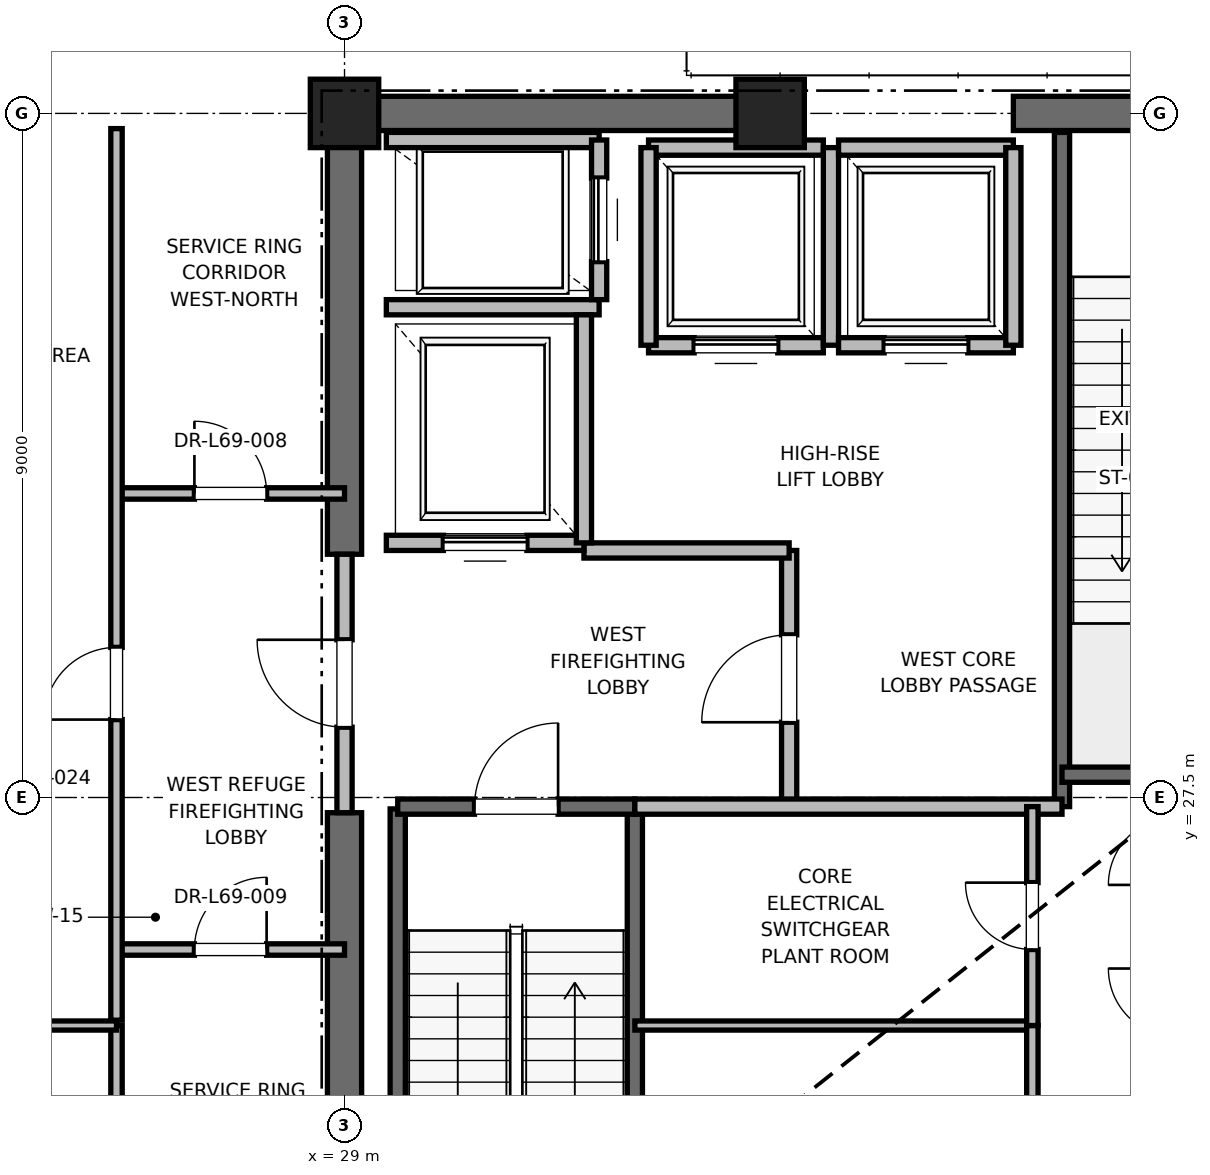
"""IFC4 building model, lengths in metres.
Left out: names, types, materials, properties, quantities, classifications, styles, units other than length and angle.
Written with IfcOpenShell. Run it as: python <this file> out.ifc"""

import sys

from ifc_helpers import new_model, si_unit, direction, frame, frame_2d, origin, origin_2d, place, context, subcontext, project, spatial, rectangle, extrude, element, fill, save


model = new_model("IFC4")
c1 = context("Model", 3, precision=1e-05, world=origin(), true_north=direction((0.0, 1.0)))
c2 = subcontext(c1, "Body", "Model", "MODEL_VIEW")
j1 = project(units=[si_unit("LENGTHUNIT", "METRE"), si_unit("PLANEANGLEUNIT", "RADIAN")], contexts=[c1])
p1 = place(None, origin())
s1 = spatial("IfcSite", under=j1, at=p1, CompositionType="ELEMENT")
p2 = place(p1, origin())
s2 = spatial("IfcBuilding", under=s1, at=p2, CompositionType="ELEMENT")
p3 = place(p2, frame((0.0, 0.0, 295.2)))
s3 = spatial("IfcBuildingStorey", under=s2, at=p3, CompositionType="ELEMENT", Elevation=295.2)
for number, where, z_axis, x_axis in (
    (1, (29.0, 36.5, 0.0), (0.0, 0.0, 1.0), (1.0, 0.0, 0.0)),
    (2, (34.6, 36.5, 0.0), (0.0, 0.0, 1.0), (1.0, 0.0, 0.0)),
):
    element("IfcColumn", number, at=place(p3, frame(where, z_axis=z_axis, x_axis=x_axis)), inside=s3, PredefinedType="PILASTER", context=c2, shape_type="SweptSolid", body=[
        extrude(rectangle(XDim=0.9, YDim=0.9, at=origin_2d()), origin(), (0.0, 0.0, 1.0), 5.8),
    ])
p4 = place(p3, frame((29.0, 36.5, 0.0), z_axis=(0.0, 0.0, 1.0), x_axis=(1.0, 0.0, 0.0)))
e3 = element("IfcWall", 3, at=p4, inside=s3, PredefinedType="SHEAR", context=c2, shape_type="SweptSolid", body=[
    extrude(rectangle(XDim=5.8, YDim=0.45, at=frame_2d((2.9, 0.0))), origin(), (0.0, 0.0, 1.0), 5.5),
])
p5 = place(p3, frame((37.8, 36.5, 0.0), z_axis=(0.0, 0.0, 1.0), x_axis=(1.0, 0.0, 0.0)))
e4 = element("IfcWall", 4, at=p5, inside=s3, PredefinedType="SHEAR", context=c2, shape_type="SweptSolid", body=[
    extrude(rectangle(XDim=4.4, YDim=0.45, at=frame_2d((2.2, 0.0))), origin(), (0.0, 0.0, 1.0), 5.5),
])
p6 = place(p5, frame((1.65, 0.0, 0.0)))
e5 = element("IfcOpeningElement", 5, at=p6, cuts=e4, PredefinedType="OPENING", context=c2, shape_type="SweptSolid", body=[
    extrude(rectangle(XDim=1.1, YDim=2.15, at=frame_2d((0.55, 1.075))), frame((0.0, 0.225, 0.0), z_axis=(0.0, -1.0, 0.0), x_axis=(1.0, 0.0, 0.0)), (0.0, 0.0, 1.0), 0.45),
])
p7 = place(p3, frame((29.0, 18.5, 0.0), z_axis=(0.0, 0.0, 1.0), x_axis=(0.0, 1.0, 0.0)))
e6 = element("IfcWall", 6, at=p7, inside=s3, PredefinedType="SHEAR", context=c2, shape_type="SweptSolid", body=[
    extrude(rectangle(XDim=8.8, YDim=0.45, at=frame_2d((4.4, 0.0))), origin(), (0.0, 0.0, 1.0), 5.5),
])
p8 = place(p3, frame((29.0, 30.7, 0.0), z_axis=(0.0, 0.0, 1.0), x_axis=(0.0, 1.0, 0.0)))
e7 = element("IfcWall", 7, at=p8, inside=s3, PredefinedType="SHEAR", context=c2, shape_type="SweptSolid", body=[
    extrude(rectangle(XDim=5.8, YDim=0.45, at=frame_2d((2.9, 0.0))), origin(), (0.0, 0.0, 1.0), 5.5),
])
p9 = place(p3, frame((29.7, 19.2, 0.0), z_axis=(0.0, 0.0, 1.0), x_axis=(0.0, 1.0, 0.0)))
e8 = element("IfcWall", 8, at=p9, inside=s3, PredefinedType="SOLIDWALL", context=c2, shape_type="SweptSolid", body=[
    extrude(rectangle(XDim=8.15, YDim=0.2, at=frame_2d((4.075, 0.0))), origin(), (0.0, 0.0, 1.0), 5.5),
])
p10 = place(p3, frame((32.82, 18.6, 0.0), z_axis=(0.0, 0.0, 1.0), x_axis=(0.0, 1.0, 0.0)))
e9 = element("IfcWall", 9, at=p10, inside=s3, PredefinedType="SOLIDWALL", context=c2, shape_type="SweptSolid", body=[
    extrude(rectangle(XDim=8.78, YDim=0.2, at=frame_2d((4.39, 0.0))), origin(), (0.0, 0.0, 1.0), 5.5),
])
p11 = place(p3, frame((29.7, 27.38, 0.0), z_axis=(0.0, 0.0, 1.0), x_axis=(1.0, 0.0, 0.0)))
e10 = element("IfcWall", 10, at=p11, inside=s3, PredefinedType="SOLIDWALL", context=c2, shape_type="SweptSolid", body=[
    extrude(rectangle(XDim=3.12, YDim=0.2, at=frame_2d((1.56, 0.0))), origin(), (0.0, 0.0, 1.0), 5.5),
])
p12 = place(p11, frame((1.01, 0.0, 0.0)))
e11 = element("IfcOpeningElement", 11, at=p12, cuts=e10, PredefinedType="OPENING", context=c2, shape_type="SweptSolid", body=[
    extrude(rectangle(XDim=1.1, YDim=2.15, at=frame_2d((0.55, 1.075))), frame((0.0, 0.1, 0.0), z_axis=(0.0, -1.0, 0.0), x_axis=(1.0, 0.0, 0.0)), (0.0, 0.0, 1.0), 0.2),
])
p13 = place(p3, frame((38.44, 27.38, 0.0), z_axis=(0.0, 0.0, 1.0), x_axis=(0.0, 1.0, 0.0)))
e12 = element("IfcWall", 12, at=p13, inside=s3, PredefinedType="SOLIDWALL", context=c2, shape_type="SweptSolid", body=[
    extrude(rectangle(XDim=8.87, YDim=0.2, at=frame_2d((4.435, 0.0))), origin(), (0.0, 0.0, 1.0), 5.5),
])
p14 = place(p3, frame((38.44, 27.8, 0.0), z_axis=(0.0, 0.0, 1.0), x_axis=(1.0, 0.0, 0.0)))
e13 = element("IfcWall", 13, at=p14, inside=s3, PredefinedType="SOLIDWALL", context=c2, shape_type="SweptSolid", body=[
    extrude(rectangle(XDim=3.32, YDim=0.2, at=frame_2d((1.66, 0.0))), origin(), (0.0, 0.0, 1.0), 5.5),
])
p15 = place(p3, frame((34.85, 27.38, 0.0), z_axis=(0.0, 0.0, 1.0), x_axis=(0.0, 1.0, 0.0)))
e14 = element("IfcWall", 14, at=p15, inside=s3, PredefinedType="PARTITIONING", context=c2, shape_type="SweptSolid", body=[
    extrude(rectangle(XDim=3.37, YDim=0.2, at=frame_2d((1.685, 0.0))), origin(), (0.0, 0.0, 1.0), 5.5),
])
p16 = place(p15, frame((1.11, 0.0, 0.0)))
e15 = element("IfcOpeningElement", 15, at=p16, cuts=e14, PredefinedType="OPENING", context=c2, shape_type="SweptSolid", body=[
    extrude(rectangle(XDim=1.15, YDim=2.2, at=frame_2d((0.575, 1.1))), frame((0.0, 0.1, 0.0), z_axis=(0.0, -1.0, 0.0), x_axis=(1.0, 0.0, 0.0)), (0.0, 0.0, 1.0), 0.2),
])
p17 = place(p3, frame((29.0, 27.3, 0.0), z_axis=(0.0, 0.0, 1.0), x_axis=(0.0, 1.0, 0.0)))
e16 = element("IfcWall", 16, at=p17, inside=s3, PredefinedType="PARTITIONING", context=c2, shape_type="SweptSolid", body=[
    extrude(rectangle(XDim=3.4, YDim=0.2, at=frame_2d((1.7, 0.0))), origin(), (0.0, 0.0, 1.0), 4.58),
])
p18 = place(p17, frame((1.125, 0.0, 0.0)))
e17 = element("IfcOpeningElement", 17, at=p18, cuts=e16, PredefinedType="OPENING", context=c2, shape_type="SweptSolid", body=[
    extrude(rectangle(XDim=1.15, YDim=2.2, at=frame_2d((0.575, 1.1))), frame((0.0, 0.1, 0.0), z_axis=(0.0, -1.0, 0.0), x_axis=(1.0, 0.0, 0.0)), (0.0, 0.0, 1.0), 0.2),
])
p19 = place(p3, frame((32.82, 27.38, 0.0), z_axis=(0.0, 0.0, 1.0), x_axis=(1.0, 0.0, 0.0)))
e18 = element("IfcWall", 18, at=p19, inside=s3, PredefinedType="PARTITIONING", context=c2, shape_type="SweptSolid", body=[
    extrude(rectangle(XDim=5.62, YDim=0.2, at=frame_2d((2.81, 0.0))), origin(), (0.0, 0.0, 1.0), 5.5),
])
p20 = place(p3, frame((32.15, 30.75, 0.0), z_axis=(0.0, 0.0, 1.0), x_axis=(1.0, 0.0, 0.0)))
e19 = element("IfcWall", 19, at=p20, inside=s3, PredefinedType="PARTITIONING", context=c2, shape_type="SweptSolid", body=[
    extrude(rectangle(XDim=2.7, YDim=0.2, at=frame_2d((1.35, 0.0))), origin(), (0.0, 0.0, 1.0), 5.5),
])
p21 = place(p3, frame((29.55, 30.85, 0.0), z_axis=(0.0, 0.0, 1.0), x_axis=(1.0, 0.0, 0.0)))
e20 = element("IfcWall", 20, at=p21, inside=s3, PredefinedType="SOLIDWALL", context=c2, shape_type="SweptSolid", body=[
    extrude(rectangle(XDim=2.6, YDim=0.2, at=frame_2d((1.3, 0.0))), origin(), (0.0, 0.0, 1.0), 4.58),
])
p22 = place(p21, frame((0.75, 0.0, 0.0)))
e21 = element("IfcOpeningElement", 21, at=p22, cuts=e20, PredefinedType="OPENING", context=c2, shape_type="SweptSolid", body=[
    extrude(rectangle(XDim=1.1, YDim=2.2, at=frame_2d((0.55, 1.1))), frame((0.0, 0.1, 0.0), z_axis=(0.0, -1.0, 0.0), x_axis=(1.0, 0.0, 0.0)), (0.0, 0.0, 1.0), 0.2),
])
p23 = place(p3, frame((29.55, 33.95, 0.0), z_axis=(0.0, 0.0, 1.0), x_axis=(1.0, 0.0, 0.0)))
e22 = element("IfcWall", 22, at=p23, inside=s3, PredefinedType="SOLIDWALL", context=c2, shape_type="SweptSolid", body=[
    extrude(rectangle(XDim=2.8, YDim=0.2, at=frame_2d((1.4, 0.0))), origin(), (0.0, 0.0, 1.0), 5.5),
])
p24 = place(p3, frame((32.15, 30.85, 0.0), z_axis=(0.0, 0.0, 1.0), x_axis=(0.0, 1.0, 0.0)))
e23 = element("IfcWall", 23, at=p24, inside=s3, PredefinedType="SOLIDWALL", context=c2, shape_type="SweptSolid", body=[
    extrude(rectangle(XDim=3.0, YDim=0.2, at=frame_2d((1.5, 0.0))), origin(), (0.0, 0.0, 1.0), 5.5),
])
p25 = place(p3, frame((32.35, 36.15, 0.0), z_axis=(0.0, 0.0, 1.0), x_axis=(-1.0, 0.0, 0.0)))
e24 = element("IfcWall", 24, at=p25, inside=s3, PredefinedType="SOLIDWALL", context=c2, shape_type="SweptSolid", body=[
    extrude(rectangle(XDim=2.8, YDim=0.2, at=frame_2d((1.4, 0.0))), origin(), (0.0, 0.0, 1.0), 4.553),
])
p26 = place(p3, frame((32.35, 34.05, 0.0), z_axis=(0.0, 0.0, 1.0), x_axis=(0.0, 1.0, 0.0)))
e25 = element("IfcWall", 25, at=p26, inside=s3, PredefinedType="SOLIDWALL", context=c2, shape_type="SweptSolid", body=[
    extrude(rectangle(XDim=2.1, YDim=0.2, at=frame_2d((1.05, 0.0))), origin(), (0.0, 0.0, 1.0), 5.5),
])
p27 = place(p26, frame((0.5, 0.0, 0.0)))
e26 = element("IfcOpeningElement", 26, at=p27, cuts=e25, PredefinedType="OPENING", context=c2, shape_type="SweptSolid", body=[
    extrude(rectangle(XDim=1.1, YDim=2.2, at=frame_2d((0.55, 1.1))), frame((0.0, 0.1, 0.0), z_axis=(0.0, -1.0, 0.0), x_axis=(1.0, 0.0, 0.0)), (0.0, 0.0, 1.0), 0.2),
])
p28 = place(p3, frame((33.0, 33.45, 0.0), z_axis=(0.0, 0.0, 1.0), x_axis=(1.0, 0.0, 0.0)))
e27 = element("IfcWall", 27, at=p28, inside=s3, PredefinedType="SOLIDWALL", context=c2, shape_type="SweptSolid", body=[
    extrude(rectangle(XDim=2.3, YDim=0.2, at=frame_2d((1.15, 0.0))), origin(), (0.0, 0.0, 1.0), 5.5),
])
p29 = place(p28, frame((0.6, 0.0, 0.0)))
e28 = element("IfcOpeningElement", 28, at=p29, cuts=e27, PredefinedType="OPENING", context=c2, shape_type="SweptSolid", body=[
    extrude(rectangle(XDim=1.1, YDim=2.2, at=frame_2d((0.55, 1.1))), frame((0.0, 0.1, 0.0), z_axis=(0.0, -1.0, 0.0), x_axis=(1.0, 0.0, 0.0)), (0.0, 0.0, 1.0), 0.2),
])
p30 = place(p3, frame((35.3, 36.05, 0.0), z_axis=(0.0, 0.0, 1.0), x_axis=(-1.0, 0.0, 0.0)))
e29 = element("IfcWall", 29, at=p30, inside=s3, PredefinedType="SOLIDWALL", context=c2, shape_type="SweptSolid", body=[
    extrude(rectangle(XDim=2.3, YDim=0.2, at=frame_2d((1.15, 0.0))), origin(), (0.0, 0.0, 1.0), 4.58),
])
p31 = place(p3, frame((33.0, 36.05, 0.0), z_axis=(0.0, 0.0, 1.0), x_axis=(0.0, -1.0, 0.0)))
e30 = element("IfcWall", 30, at=p31, inside=s3, PredefinedType="SOLIDWALL", context=c2, shape_type="SweptSolid", body=[
    extrude(rectangle(XDim=2.6, YDim=0.2, at=frame_2d((1.3, 0.0))), origin(), (0.0, 0.0, 1.0), 5.5),
])
p32 = place(p3, frame((35.4, 33.45, 0.0), z_axis=(0.0, 0.0, 1.0), x_axis=(0.0, 1.0, 0.0)))
e31 = element("IfcWall", 31, at=p32, inside=s3, PredefinedType="SOLIDWALL", context=c2, shape_type="SweptSolid", body=[
    extrude(rectangle(XDim=2.6, YDim=0.2, at=frame_2d((1.3, 0.0))), origin(), (0.0, 0.0, 1.0), 4.58),
])
p33 = place(p3, frame((35.5, 33.45, 0.0), z_axis=(0.0, 0.0, 1.0), x_axis=(1.0, 0.0, 0.0)))
e32 = element("IfcWall", 32, at=p33, inside=s3, PredefinedType="SOLIDWALL", context=c2, shape_type="SweptSolid", body=[
    extrude(rectangle(XDim=2.3, YDim=0.2, at=frame_2d((1.15, 0.0))), origin(), (0.0, 0.0, 1.0), 5.5),
])
p34 = place(p33, frame((0.6, 0.0, 0.0)))
e33 = element("IfcOpeningElement", 33, at=p34, cuts=e32, PredefinedType="OPENING", context=c2, shape_type="SweptSolid", body=[
    extrude(rectangle(XDim=1.1, YDim=2.2, at=frame_2d((0.55, 1.1))), frame((0.0, 0.1, 0.0), z_axis=(0.0, -1.0, 0.0), x_axis=(1.0, 0.0, 0.0)), (0.0, 0.0, 1.0), 0.2),
])
p35 = place(p3, frame((37.8, 36.05, 0.0), z_axis=(0.0, 0.0, 1.0), x_axis=(-1.0, 0.0, 0.0)))
e34 = element("IfcWall", 34, at=p35, inside=s3, PredefinedType="SOLIDWALL", context=c2, shape_type="SweptSolid", body=[
    extrude(rectangle(XDim=2.3, YDim=0.2, at=frame_2d((1.15, 0.0))), origin(), (0.0, 0.0, 1.0), 4.58),
])
p36 = place(p3, frame((37.8, 33.45, 0.0), z_axis=(0.0, 0.0, 1.0), x_axis=(0.0, 1.0, 0.0)))
e35 = element("IfcWall", 35, at=p36, inside=s3, PredefinedType="SOLIDWALL", context=c2, shape_type="SweptSolid", body=[
    extrude(rectangle(XDim=2.6, YDim=0.2, at=frame_2d((1.3, 0.0))), origin(), (0.0, 0.0, 1.0), 4.58),
])
p37 = place(p3, frame((32.82, 24.5, 0.0), z_axis=(0.0, 0.0, 1.0), x_axis=(1.0, 0.0, 0.0)))
e36 = element("IfcWall", 36, at=p37, inside=s3, PredefinedType="PARTITIONING", context=c2, shape_type="SweptSolid", body=[
    extrude(rectangle(XDim=5.23, YDim=0.12, at=frame_2d((2.615, 0.0))), origin(), (0.0, 0.0, 1.0), 2.85),
])
p38 = place(p3, frame((38.05, 21.66, 0.0), z_axis=(0.0, 0.0, 1.0), x_axis=(0.0, 1.0, 0.0)))
e37 = element("IfcWall", 37, at=p38, inside=s3, PredefinedType="PARTITIONING", context=c2, shape_type="SweptSolid", body=[
    extrude(rectangle(XDim=2.84, YDim=0.15, at=frame_2d((1.42, 0.0))), origin(), (0.0, 0.0, 1.0), 2.85),
])
p39 = place(p38, frame((0.98, 0.0, 0.0)))
e38 = element("IfcOpeningElement", 38, at=p39, cuts=e37, PredefinedType="OPENING", context=c2, shape_type="SweptSolid", body=[
    extrude(rectangle(XDim=0.88, YDim=2.1, at=frame_2d((0.44, 1.05))), frame((0.0, 0.075, 0.0), z_axis=(0.0, -1.0, 0.0), x_axis=(1.0, 0.0, 0.0)), (0.0, 0.0, 1.0), 0.15),
])
p40 = place(p3, frame((38.05, 24.5, 0.0), z_axis=(0.0, 0.0, 1.0), x_axis=(0.0, 1.0, 0.0)))
e39 = element("IfcWall", 39, at=p40, inside=s3, PredefinedType="PARTITIONING", context=c2, shape_type="SweptSolid", body=[
    extrude(rectangle(XDim=2.88, YDim=0.15, at=frame_2d((1.44, 0.0))), origin(), (0.0, 0.0, 1.0), 2.85),
])
p41 = place(p40, frame((1.0, 0.0, 0.0)))
e40 = element("IfcOpeningElement", 40, at=p41, cuts=e39, PredefinedType="OPENING", context=c2, shape_type="SweptSolid", body=[
    extrude(rectangle(XDim=0.88, YDim=2.1, at=frame_2d((0.44, 1.05))), frame((0.0, 0.075, 0.0), z_axis=(0.0, -1.0, 0.0), x_axis=(1.0, 0.0, 0.0)), (0.0, 0.0, 1.0), 0.15),
])
p42 = place(p3, frame((26.0, 25.5, 0.0), z_axis=(0.0, 0.0, 1.0), x_axis=(1.0, 0.0, 0.0)))
e41 = element("IfcWall", 41, at=p42, inside=s3, PredefinedType="PARTITIONING", context=c2, shape_type="SweptSolid", body=[
    extrude(rectangle(XDim=3.0, YDim=0.15, at=frame_2d((1.5, 0.0))), origin(), (0.0, 0.0, 1.0), 2.85),
])
p43 = place(p42, frame((1.025, 0.0, 0.0)))
e42 = element("IfcOpeningElement", 42, at=p43, cuts=e41, PredefinedType="OPENING", context=c2, shape_type="SweptSolid", body=[
    extrude(rectangle(XDim=0.95, YDim=2.15, at=frame_2d((0.475, 1.075))), frame((0.0, 0.075, 0.0), z_axis=(0.0, -1.0, 0.0), x_axis=(1.0, 0.0, 0.0)), (0.0, 0.0, 1.0), 0.15),
])
p44 = place(p3, frame((26.0, 31.5, 0.0), z_axis=(0.0, 0.0, 1.0), x_axis=(1.0, 0.0, 0.0)))
e43 = element("IfcWall", 43, at=p44, inside=s3, PredefinedType="PARTITIONING", context=c2, shape_type="SweptSolid", body=[
    extrude(rectangle(XDim=3.0, YDim=0.15, at=frame_2d((1.5, 0.0))), origin(), (0.0, 0.0, 1.0), 2.85),
])
p45 = place(p44, frame((1.025, 0.0, 0.0)))
e44 = element("IfcOpeningElement", 44, at=p45, cuts=e43, PredefinedType="OPENING", context=c2, shape_type="SweptSolid", body=[
    extrude(rectangle(XDim=0.95, YDim=2.15, at=frame_2d((0.475, 1.075))), frame((0.0, 0.075, 0.0), z_axis=(0.0, -1.0, 0.0), x_axis=(1.0, 0.0, 0.0)), (0.0, 0.0, 1.0), 0.15),
])
p46 = place(p3, frame((26.0, 18.7, 0.0), z_axis=(0.0, 0.0, 1.0), x_axis=(0.0, 1.0, 0.0)))
e45 = element("IfcWall", 45, at=p46, inside=s3, PredefinedType="PARTITIONING", context=c2, shape_type="SweptSolid", body=[
    extrude(rectangle(XDim=5.8, YDim=0.15, at=frame_2d((2.9, 0.0))), origin(), (0.0, 0.0, 1.0), 2.85),
])
p47 = place(p46, frame((2.065, 0.0, 0.0)))
e46 = element("IfcOpeningElement", 46, at=p47, cuts=e45, PredefinedType="OPENING", context=c2, shape_type="SweptSolid", body=[
    extrude(rectangle(XDim=1.6, YDim=2.25, at=frame_2d((0.8, 1.125))), frame((0.0, 0.075, 0.0), z_axis=(0.0, -1.0, 0.0), x_axis=(1.0, 0.0, 0.0)), (0.0, 0.0, 1.0), 0.15),
])
p48 = place(p3, frame((21.7, 24.5, 0.0), z_axis=(0.0, 0.0, 1.0), x_axis=(1.0, 0.0, 0.0)))
e47 = element("IfcWall", 47, at=p48, inside=s3, PredefinedType="PARTITIONING", context=c2, shape_type="SweptSolid", body=[
    extrude(rectangle(XDim=4.3, YDim=0.12, at=frame_2d((2.15, 0.0))), origin(), (0.0, 0.0, 1.0), 2.85),
])
p49 = place(p3, frame((26.0, 24.57, 0.0), z_axis=(0.0, 0.0, 1.0), x_axis=(0.0, 1.0, 0.0)))
e48 = element("IfcWall", 48, at=p49, inside=s3, PredefinedType="PARTITIONING", context=c2, shape_type="SweptSolid", body=[
    extrude(rectangle(XDim=11.73, YDim=0.15, at=frame_2d((5.865, 0.0))), origin(), (0.0, 0.0, 1.0), 2.85),
])
p50 = place(p49, frame((3.955, 0.0, 0.0)))
e49 = element("IfcOpeningElement", 49, at=p50, cuts=e48, PredefinedType="OPENING", context=c2, shape_type="SweptSolid", body=[
    extrude(rectangle(XDim=0.95, YDim=2.15, at=frame_2d((0.475, 1.075))), frame((0.0, 0.075, 0.0), z_axis=(0.0, -1.0, 0.0), x_axis=(1.0, 0.0, 0.0)), (0.0, 0.0, 1.0), 0.15),
])
p51 = place(p12, origin())
e50 = element("IfcDoor", 50, at=p51, inside=s3, OperationType="SINGLE_SWING_RIGHT", PredefinedType="DOOR", context=c2, shape_type="SweptSolid", body=[
    extrude(rectangle(XDim=1.1, YDim=2.15, at=frame_2d((0.55, 1.075))), frame((0.0, 0.025, 0.0), z_axis=(0.0, -1.0, 0.0), x_axis=(1.0, 0.0, 0.0)), (0.0, 0.0, 1.0), 0.05),
])
fill(e11, e50)
p52 = place(p16, origin())
e51 = element("IfcDoor", 51, at=p52, inside=s3, OperationType="SINGLE_SWING_LEFT", PredefinedType="DOOR", context=c2, shape_type="SweptSolid", body=[
    extrude(rectangle(XDim=1.15, YDim=2.2, at=frame_2d((0.575, 1.1))), frame((0.0, 0.025, 0.0), z_axis=(0.0, -1.0, 0.0), x_axis=(1.0, 0.0, 0.0)), (0.0, 0.0, 1.0), 0.05),
])
fill(e15, e51)
p53 = place(p18, origin())
e52 = element("IfcDoor", 52, at=p53, inside=s3, OperationType="SINGLE_SWING_RIGHT", PredefinedType="DOOR", context=c2, shape_type="SweptSolid", body=[
    extrude(rectangle(XDim=1.15, YDim=2.2, at=frame_2d((0.575, 1.1))), frame((0.0, 0.025, 0.0), z_axis=(0.0, -1.0, 0.0), x_axis=(1.0, 0.0, 0.0)), (0.0, 0.0, 1.0), 0.05),
])
fill(e17, e52)
p54 = place(p22, origin())
e53 = element("IfcDoor", 53, at=p54, inside=s3, OperationType="SLIDING_TO_RIGHT", PredefinedType="DOOR", context=c2, shape_type="SweptSolid", body=[
    extrude(rectangle(XDim=1.1, YDim=2.2, at=frame_2d((0.55, 1.1))), frame((0.0, 0.025, 0.0), z_axis=(0.0, -1.0, 0.0), x_axis=(1.0, 0.0, 0.0)), (0.0, 0.0, 1.0), 0.05),
])
fill(e21, e53)
p55 = place(p27, origin())
e54 = element("IfcDoor", 54, at=p55, inside=s3, OperationType="SLIDING_TO_RIGHT", PredefinedType="DOOR", context=c2, shape_type="SweptSolid", body=[
    extrude(rectangle(XDim=1.1, YDim=2.2, at=frame_2d((0.55, 1.1))), frame((0.0, 0.025, 0.0), z_axis=(0.0, -1.0, 0.0), x_axis=(1.0, 0.0, 0.0)), (0.0, 0.0, 1.0), 0.05),
])
fill(e26, e54)
p56 = place(p29, origin())
e55 = element("IfcDoor", 55, at=p56, inside=s3, OperationType="SLIDING_TO_RIGHT", PredefinedType="DOOR", context=c2, shape_type="SweptSolid", body=[
    extrude(rectangle(XDim=1.1, YDim=2.2, at=frame_2d((0.55, 1.1))), frame((0.0, 0.025, 0.0), z_axis=(0.0, -1.0, 0.0), x_axis=(1.0, 0.0, 0.0)), (0.0, 0.0, 1.0), 0.05),
])
fill(e28, e55)
p57 = place(p34, origin())
e56 = element("IfcDoor", 56, at=p57, inside=s3, OperationType="SLIDING_TO_RIGHT", PredefinedType="DOOR", context=c2, shape_type="SweptSolid", body=[
    extrude(rectangle(XDim=1.1, YDim=2.2, at=frame_2d((0.55, 1.1))), frame((0.0, 0.025, 0.0), z_axis=(0.0, -1.0, 0.0), x_axis=(1.0, 0.0, 0.0)), (0.0, 0.0, 1.0), 0.05),
])
fill(e33, e56)
p58 = place(p41, origin())
e57 = element("IfcDoor", 57, at=p58, inside=s3, OperationType="SINGLE_SWING_RIGHT", PredefinedType="DOOR", context=c2, shape_type="SweptSolid", body=[
    extrude(rectangle(XDim=0.88, YDim=2.1, at=frame_2d((0.44, 1.05))), frame((0.0, 0.025, 0.0), z_axis=(0.0, -1.0, 0.0), x_axis=(1.0, 0.0, 0.0)), (0.0, 0.0, 1.0), 0.05),
])
fill(e40, e57)
p59 = place(p43, origin())
e58 = element("IfcDoor", 58, at=p59, inside=s3, OperationType="SINGLE_SWING_RIGHT", PredefinedType="DOOR", context=c2, shape_type="SweptSolid", body=[
    extrude(rectangle(XDim=0.95, YDim=2.15, at=frame_2d((0.475, 1.075))), frame((0.0, 0.025, 0.0), z_axis=(0.0, -1.0, 0.0), x_axis=(1.0, 0.0, 0.0)), (0.0, 0.0, 1.0), 0.05),
])
fill(e42, e58)
p60 = place(p45, origin())
e59 = element("IfcDoor", 59, at=p60, inside=s3, OperationType="SINGLE_SWING_LEFT", PredefinedType="DOOR", context=c2, shape_type="SweptSolid", body=[
    extrude(rectangle(XDim=0.95, YDim=2.15, at=frame_2d((0.475, 1.075))), frame((0.0, 0.025, 0.0), z_axis=(0.0, -1.0, 0.0), x_axis=(1.0, 0.0, 0.0)), (0.0, 0.0, 1.0), 0.05),
])
fill(e44, e59)
p61 = place(p50, origin())
e60 = element("IfcDoor", 60, at=p61, inside=s3, OperationType="SINGLE_SWING_LEFT", PredefinedType="DOOR", context=c2, shape_type="SweptSolid", body=[
    extrude(rectangle(XDim=0.95, YDim=2.15, at=frame_2d((0.475, 1.075))), frame((0.0, 0.025, 0.0), z_axis=(0.0, -1.0, 0.0), x_axis=(1.0, 0.0, 0.0)), (0.0, 0.0, 1.0), 0.05),
])
fill(e49, e60)
save(model, sys.argv[1])
